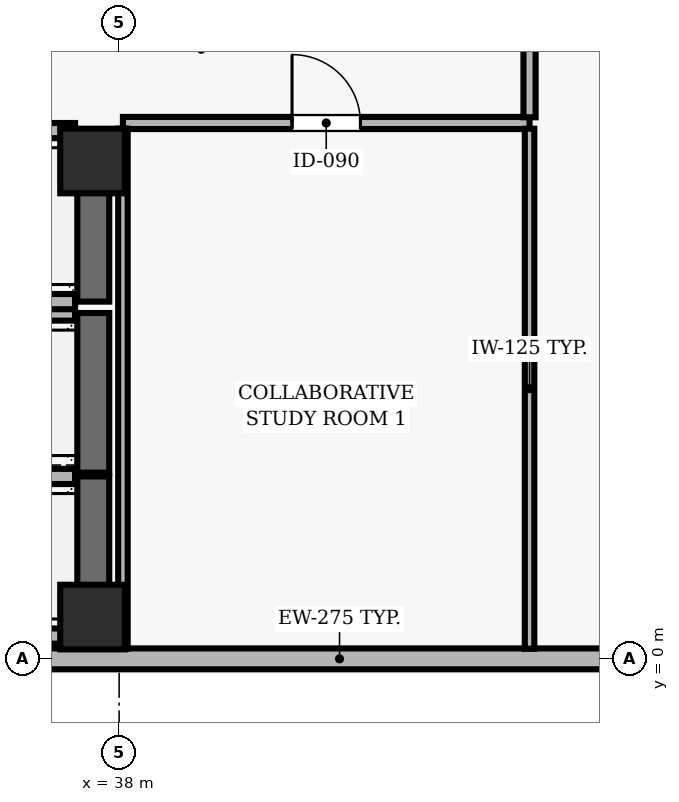
"""IFC4 building model, lengths in metres.
Left out: names, types, materials, properties, quantities, classifications, styles, units other than length and angle.
Written with IfcOpenShell. Run it as: python <this file> out.ifc"""

import sys

from ifc_helpers import new_model, si_unit, direction, frame, frame_2d, origin, origin_2d, place, context, subcontext, project, spatial, rectangle, extrude, element, fill, save


model = new_model("IFC4")
c1 = context("Model", 3, precision=1e-05, world=origin(), true_north=direction((0.0, 1.0)))
c2 = subcontext(c1, "Body", "Model", "MODEL_VIEW")
j1 = project(units=[si_unit("LENGTHUNIT", "METRE"), si_unit("PLANEANGLEUNIT", "RADIAN")], contexts=[c1])
p1 = place(None, origin())
s1 = spatial("IfcSite", under=j1, at=p1, CompositionType="ELEMENT")
p2 = place(p1, origin())
s2 = spatial("IfcBuilding", under=s1, at=p2, CompositionType="ELEMENT")
p3 = place(p2, frame((0.0, 0.0, 291.1)))
s3 = spatial("IfcBuildingStorey", under=s2, at=p3, CompositionType="ELEMENT", Elevation=291.1)
for number, where, z_axis, x_axis in (
    (1, (37.65, 0.55, 0.0), (0.0, 0.0, 1.0), (1.0, 0.0, 0.0)),
    (2, (37.65, 6.55, 0.0), (0.0, 0.0, 1.0), (1.0, 0.0, 0.0)),
):
    element("IfcColumn", number, at=place(p3, frame(where, z_axis=z_axis, x_axis=x_axis)), inside=s3, PredefinedType="COLUMN", context=c2, shape_type="SweptSolid", body=[
        extrude(rectangle(XDim=0.85, YDim=0.85, at=origin_2d()), origin(), (0.0, 0.0, 1.0), 3.9),
    ])
p4 = place(p3, frame((24.5, 0.0, 0.0), z_axis=(0.0, 0.0, 1.0), x_axis=(1.0, 0.0, 0.0)))
e3 = element("IfcWall", 3, at=p4, inside=s3, PredefinedType="SOLIDWALL", context=c2, shape_type="SweptSolid", body=[
    extrude(rectangle(XDim=32.8, YDim=0.275, at=frame_2d((16.4, 0.0))), origin(), (0.0, 0.0, 1.0), 3.69),
])
p5 = place(p4, frame((1.233, 0.0, 0.9)))
e4 = element("IfcOpeningElement", 4, at=p5, cuts=e3, PredefinedType="OPENING", context=c2, shape_type="SweptSolid", body=[
    extrude(rectangle(XDim=3.0, YDim=2.2, at=frame_2d((1.5, 1.1))), frame((0.0, 0.147, 0.0), z_axis=(0.0, -1.0, 0.0), x_axis=(1.0, 0.0, 0.0)), (0.0, 0.0, 1.0), 0.295),
])
p6 = place(p3, frame((37.66, 0.3, 0.0), z_axis=(0.0, 0.0, 1.0), x_axis=(0.0, 1.0, 0.0)))
e5 = element("IfcWall", 5, at=p6, inside=s3, PredefinedType="SHEAR", context=c2, shape_type="SweptSolid", body=[
    extrude(rectangle(XDim=2.1, YDim=0.42, at=frame_2d((1.05, 0.0))), origin(), (0.0, 0.0, 1.0), 3.69),
])
for number, where, z_axis, x_axis in (
    (6, (35.28, 0.3, 0.0), (0.0, 0.0, 1.0), (1.0, 0.0, 0.0)),
    (7, (37.42, 2.4, 0.0), (0.0, 0.0, 1.0), (-1.0, 0.0, 0.0)),
):
    element("IfcWall", number, at=place(p3, frame(where, z_axis=z_axis, x_axis=x_axis)), inside=s3, PredefinedType="SOLIDWALL", context=c2, shape_type="SweptSolid", body=[
        extrude(rectangle(XDim=2.14, YDim=0.2, at=frame_2d((1.07, 0.0))), origin(), (0.0, 0.0, 1.0), 3.69),
    ])
p7 = place(p3, frame((37.66, 2.45, 0.0), z_axis=(0.0, 0.0, 1.0), x_axis=(0.0, 1.0, 0.0)))
e8 = element("IfcWall", 8, at=p7, inside=s3, PredefinedType="SHEAR", context=c2, shape_type="SweptSolid", body=[
    extrude(rectangle(XDim=2.1, YDim=0.42, at=frame_2d((1.05, 0.0))), origin(), (0.0, 0.0, 1.0), 3.69),
])
p8 = place(p3, frame((37.42, 4.55, 0.0), z_axis=(0.0, 0.0, 1.0), x_axis=(-1.0, 0.0, 0.0)))
e9 = element("IfcWall", 9, at=p8, inside=s3, PredefinedType="SOLIDWALL", context=c2, shape_type="SweptSolid", body=[
    extrude(rectangle(XDim=2.14, YDim=0.2, at=frame_2d((1.07, 0.0))), origin(), (0.0, 0.0, 1.0), 3.69),
])
p9 = place(p3, frame((37.66, 4.7, 0.0), z_axis=(0.0, 0.0, 1.0), x_axis=(0.0, 1.0, 0.0)))
e10 = element("IfcWall", 10, at=p9, inside=s3, PredefinedType="SHEAR", context=c2, shape_type="SweptSolid", body=[
    extrude(rectangle(XDim=2.25, YDim=0.42, at=frame_2d((1.125, 0.0))), origin(), (0.0, 0.0, 1.0), 3.69),
])
for number, where, z_axis, x_axis in (
    (11, (35.28, 4.7, 0.0), (0.0, 0.0, 1.0), (1.0, 0.0, 0.0)),
    (12, (37.42, 6.95, 0.0), (0.0, 0.0, 1.0), (-1.0, 0.0, 0.0)),
):
    element("IfcWall", number, at=place(p3, frame(where, z_axis=z_axis, x_axis=x_axis)), inside=s3, PredefinedType="SOLIDWALL", context=c2, shape_type="SweptSolid", body=[
        extrude(rectangle(XDim=2.14, YDim=0.2, at=frame_2d((1.07, 0.0))), origin(), (0.0, 0.0, 1.0), 3.69),
    ])
p10 = place(p3, frame((38.05, 7.05, 0.0), z_axis=(0.0, 0.0, 1.0), x_axis=(1.0, 0.0, 0.0)))
e13 = element("IfcWall", 13, at=p10, inside=s3, PredefinedType="PARTITIONING", context=c2, shape_type="SweptSolid", body=[
    extrude(rectangle(XDim=5.35, YDim=0.16, at=frame_2d((2.675, 0.0))), origin(), (0.0, 0.0, 1.0), 3.69),
])
p11 = place(p10, frame((2.225, 0.0, 0.0)))
e14 = element("IfcOpeningElement", 14, at=p11, cuts=e13, PredefinedType="OPENING", context=c2, shape_type="SweptSolid", body=[
    extrude(rectangle(XDim=0.9, YDim=2.1, at=frame_2d((0.45, 1.05))), frame((0.0, 0.09, 0.0), z_axis=(0.0, -1.0, 0.0), x_axis=(1.0, 0.0, 0.0)), (0.0, 0.0, 1.0), 0.18),
])
p12 = place(p3, frame((38.05, 6.975, 0.0), z_axis=(0.0, 0.0, 1.0), x_axis=(0.0, -1.0, 0.0)))
e15 = element("IfcWall", 15, at=p12, inside=s3, PredefinedType="PARTITIONING", context=c2, shape_type="SweptSolid", body=[
    extrude(rectangle(XDim=6.842, YDim=0.125, at=frame_2d((3.421, 0.0))), origin(), (0.0, 0.0, 1.0), 3.227),
])
p13 = place(p3, frame((43.4, 0.133, 0.0), z_axis=(0.0, 0.0, 1.0), x_axis=(0.0, 1.0, 0.0)))
e16 = element("IfcWall", 16, at=p13, inside=s3, PredefinedType="PARTITIONING", context=c2, shape_type="SweptSolid", body=[
    extrude(rectangle(XDim=6.842, YDim=0.125, at=frame_2d((3.421, 0.0))), origin(), (0.0, 0.0, 1.0), 3.69),
])
p14 = place(p3, frame((43.4, 7.125, 0.0), z_axis=(0.0, 0.0, 1.0), x_axis=(0.0, 1.0, 0.0)))
e17 = element("IfcWall", 17, at=p14, inside=s3, PredefinedType="PARTITIONING", context=c2, shape_type="SweptSolid", body=[
    extrude(rectangle(XDim=1.05, YDim=0.16, at=frame_2d((0.525, 0.0))), origin(), (0.0, 0.0, 1.0), 3.69),
])
p15 = place(p11, origin())
e18 = element("IfcDoor", 18, at=p15, inside=s3, OperationType="SINGLE_SWING_LEFT", PredefinedType="DOOR", context=c2, shape_type="SweptSolid", body=[
    extrude(rectangle(XDim=0.9, YDim=2.1, at=frame_2d((0.45, 1.05))), frame((0.0, 0.025, 0.0), z_axis=(0.0, -1.0, 0.0), x_axis=(1.0, 0.0, 0.0)), (0.0, 0.0, 1.0), 0.05),
])
fill(e14, e18)
save(model, sys.argv[1])
